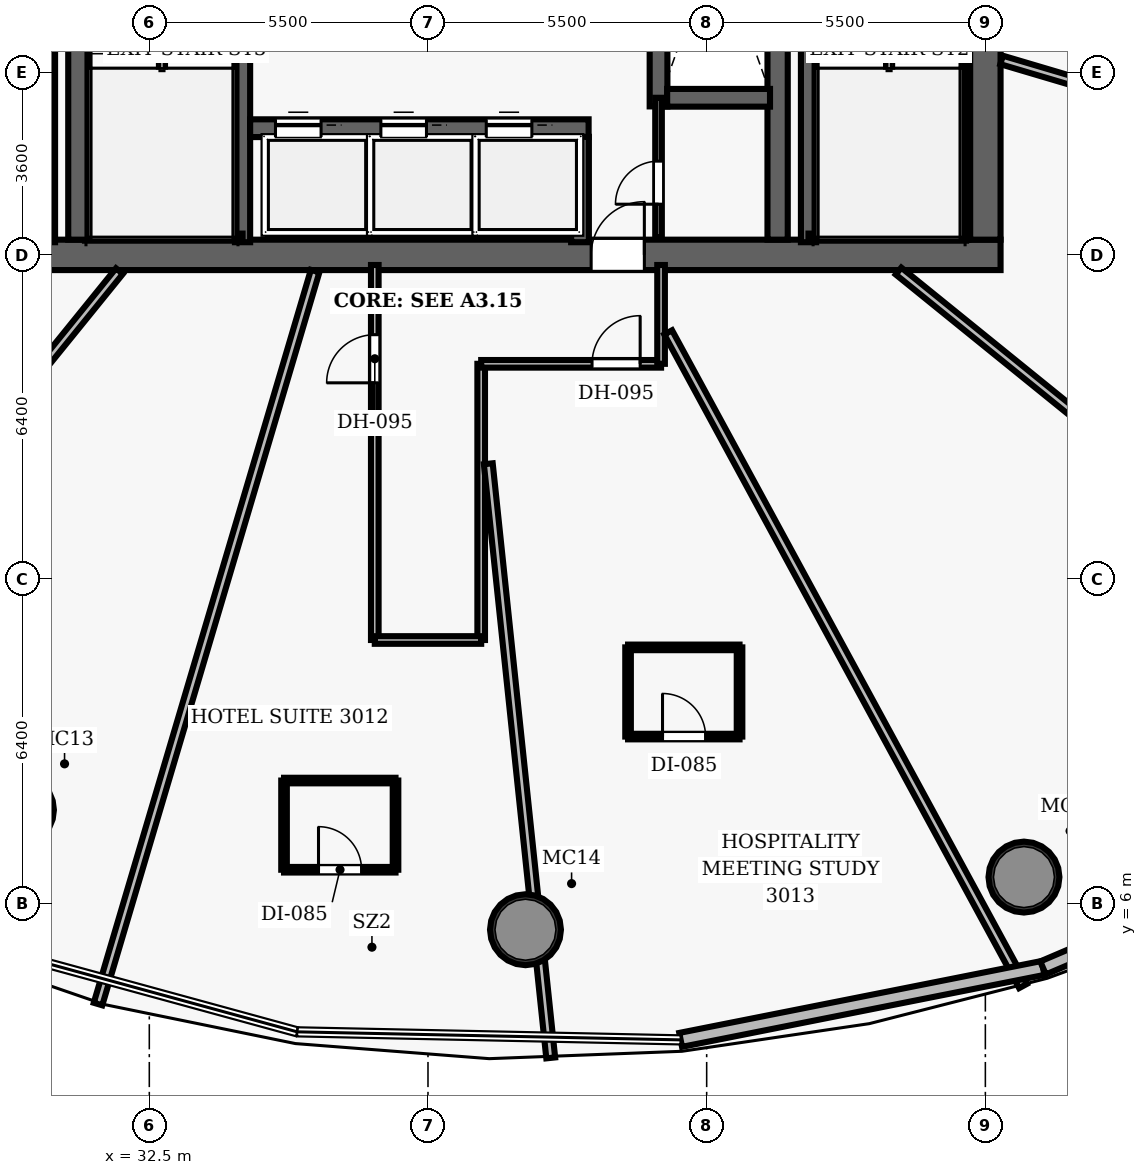
"""IFC4 building model, lengths in metres.
Left out: names, types, materials, properties, quantities, classifications, styles, units other than length and angle.
Written with IfcOpenShell. Run it as: python <this file> out.ifc"""

import sys

from ifc_helpers import new_model, si_unit, direction, frame, frame_2d, origin, origin_2d, place, context, subcontext, project, spatial, rectangle, hollow_circle, extrude, element, fill, save


model = new_model("IFC4")
c1 = context("Model", 3, precision=1e-05, world=origin(), true_north=direction((0.0, 1.0)))
c2 = subcontext(c1, "Body", "Model", "MODEL_VIEW")
j1 = project(units=[si_unit("LENGTHUNIT", "METRE"), si_unit("PLANEANGLEUNIT", "RADIAN")], contexts=[c1])
p1 = place(None, origin())
s1 = spatial("IfcSite", under=j1, at=p1, CompositionType="ELEMENT")
p2 = place(p1, origin())
s2 = spatial("IfcBuilding", under=s1, at=p2, CompositionType="ELEMENT")
p3 = place(p2, frame((0.0, 0.0, 123.8)))
s3 = spatial("IfcBuildingStorey", under=s2, at=p3, CompositionType="ELEMENT", Elevation=123.8)
p4 = place(p3, frame((26.7, 18.8, 0.0), z_axis=(0.0, 0.0, 1.0), x_axis=(1.0, 0.0, 0.0)))
e1 = element("IfcWall", 1, at=p4, inside=s3, PredefinedType="SHEAR", context=c2, shape_type="SweptSolid", body=[
    extrude(rectangle(XDim=22.6, YDim=0.6, at=frame_2d((11.3, 0.0))), origin(), (0.0, 0.0, 1.0), 3.5),
])
p5 = place(p4, frame((14.52, 0.0, 0.0)))
e2 = element("IfcOpeningElement", 2, at=p5, cuts=e1, PredefinedType="OPENING", context=c2, shape_type="SweptSolid", body=[
    extrude(rectangle(XDim=1.05, YDim=2.15, at=frame_2d((0.525, 1.075))), frame((0.0, 0.31, 0.0), z_axis=(0.0, -1.0, 0.0), x_axis=(1.0, 0.0, 0.0)), (0.0, 0.0, 1.0), 0.62),
])
p6 = place(p3, frame((49.0, 19.1, 0.0), z_axis=(0.0, 0.0, 1.0), x_axis=(0.0, 1.0, 0.0)))
e3 = element("IfcWall", 3, at=p6, inside=s3, PredefinedType="SHEAR", context=c2, shape_type="SweptSolid", body=[
    extrude(rectangle(XDim=13.8, YDim=0.6, at=frame_2d((6.9, 0.0))), origin(), (0.0, 0.0, 1.0), 3.5),
])
p7 = place(p6, frame((8.2, 0.0, 0.0)))
e4 = element("IfcOpeningElement", 4, at=p7, cuts=e3, PredefinedType="OPENING", context=c2, shape_type="SweptSolid", body=[
    extrude(rectangle(XDim=1.05, YDim=2.15, at=frame_2d((0.525, 1.075))), frame((0.0, 0.31, 0.0), z_axis=(0.0, -1.0, 0.0), x_axis=(1.0, 0.0, 0.0)), (0.0, 0.0, 1.0), 0.62),
])
for number, where, z_axis, x_axis in (
    (5, (31.1, 19.1, 0.0), (0.0, 0.0, 1.0), (0.0, 1.0, 0.0)),
    (6, (44.9, 19.1, 0.0), (0.0, 0.0, 1.0), (0.0, 1.0, 0.0)),
):
    element("IfcWall", number, at=place(p3, frame(where, z_axis=z_axis, x_axis=x_axis)), inside=s3, PredefinedType="SHEAR", context=c2, shape_type="SweptSolid", body=[
        extrude(rectangle(XDim=13.8, YDim=0.4, at=frame_2d((6.9, 0.0))), origin(), (0.0, 0.0, 1.0), 3.5),
    ])
for number, where, z_axis, x_axis in (
    (7, (29.917, 7.846, 0.0), (0.0, 0.0, 1.0), (1.0, 0.0, 0.0)),
    (8, (39.924, 5.483, 0.0), (0.0, 0.0, 1.0), (1.0, 0.0, 0.0)),
    (9, (49.762, 6.521, 0.0), (0.0, 0.0, 1.0), (1.0, 0.0, 0.0)),
):
    element("IfcColumn", number, at=place(p3, frame(where, z_axis=z_axis, x_axis=x_axis)), inside=s3, PredefinedType="COLUMN", context=c2, shape_type="SweptSolid", body=[
        extrude(hollow_circle(Radius=0.7, WallThickness=0.055, at=origin_2d()), origin(), (0.0, 0.0, 1.0), 3.5),
    ])
for number, where, z_axis, x_axis in (
    (10, (30.49, 19.05, 0.0), (0.0, 0.0, 1.0), (0.0, 1.0, 0.0)),
    (11, (45.51, 19.05, 0.0), (0.0, 0.0, 1.0), (0.0, 1.0, 0.0)),
):
    element("IfcWall", number, at=place(p3, frame(where, z_axis=z_axis, x_axis=x_axis)), inside=s3, PredefinedType="SHEAR", context=c2, shape_type="SweptSolid", body=[
        extrude(rectangle(XDim=7.5, YDim=0.3, at=frame_2d((3.75, 0.0))), origin(), (0.0, 0.0, 1.0), 3.5),
    ])
p8 = place(p3, frame((48.605, 19.1, 0.0), z_axis=(0.0, 0.0, 1.0), x_axis=(0.0, 1.0, 0.0)))
e12 = element("IfcWall", 12, at=p8, inside=s3, PredefinedType="SHEAR", context=c2, shape_type="SweptSolid", body=[
    extrude(rectangle(XDim=7.45, YDim=0.12, at=frame_2d((3.725, 0.0))), origin(), (0.0, 0.0, 1.0), 3.5),
])
p9 = place(p3, frame((45.51, 19.16, 0.0), z_axis=(0.0, 0.0, 1.0), x_axis=(1.0, 0.0, 0.0)))
e13 = element("IfcWall", 13, at=p9, inside=s3, PredefinedType="SHEAR", context=c2, shape_type="SweptSolid", body=[
    extrude(rectangle(XDim=3.095, YDim=0.12, at=frame_2d((1.547, 0.0))), origin(), (0.0, 0.0, 1.0), 3.5),
])
p10 = place(p3, frame((34.34, 19.05, 0.0), z_axis=(0.0, 0.0, 1.0), x_axis=(0.0, 1.0, 0.0)))
e14 = element("IfcWall", 14, at=p10, inside=s3, PredefinedType="SHEAR", context=c2, shape_type="SweptSolid", body=[
    extrude(rectangle(XDim=7.5, YDim=0.3, at=frame_2d((3.75, 0.0))), origin(), (0.0, 0.0, 1.0), 3.5),
])
p11 = place(p3, frame((31.3, 19.16, 0.0), z_axis=(0.0, 0.0, 1.0), x_axis=(1.0, 0.0, 0.0)))
e15 = element("IfcWall", 15, at=p11, inside=s3, PredefinedType="SHEAR", context=c2, shape_type="SweptSolid", body=[
    extrude(rectangle(XDim=3.04, YDim=0.12, at=frame_2d((1.52, 0.0))), origin(), (0.0, 0.0, 1.0), 3.5),
])
p12 = place(p3, frame((42.55, 21.73, 0.0), z_axis=(0.0, 0.0, 1.0), x_axis=(0.0, 1.0, 0.0)))
e16 = element("IfcWall", 16, at=p12, inside=s3, PredefinedType="SHEAR", context=c2, shape_type="SweptSolid", body=[
    extrude(rectangle(XDim=6.54, YDim=0.35, at=frame_2d((3.27, 0.0))), origin(), (0.0, 0.0, 1.0), 2.675),
])
p13 = place(p3, frame((42.72, 21.9, 0.0), z_axis=(0.0, 0.0, 1.0), x_axis=(1.0, 0.0, 0.0)))
e17 = element("IfcWall", 17, at=p13, inside=s3, PredefinedType="SHEAR", context=c2, shape_type="SweptSolid", body=[
    extrude(rectangle(XDim=2.03, YDim=0.35, at=frame_2d((1.015, 0.0))), origin(), (0.0, 0.0, 1.0), 2.675),
])
p14 = place(p3, frame((34.49, 21.3, 0.0), z_axis=(0.0, 0.0, 1.0), x_axis=(1.0, 0.0, 0.0)))
e18 = element("IfcWall", 18, at=p14, inside=s3, PredefinedType="SHEAR", context=c2, shape_type="SweptSolid", body=[
    extrude(rectangle(XDim=6.68, YDim=0.35, at=frame_2d((3.34, 0.0))), origin(), (0.0, 0.0, 1.0), 2.675),
])
p15 = place(p14, frame((0.5, 0.0, 0.0)))
e19 = element("IfcOpeningElement", 19, at=p15, cuts=e18, PredefinedType="OPENING", context=c2, shape_type="SweptSolid", body=[
    extrude(rectangle(XDim=0.9, YDim=2.15, at=frame_2d((0.45, 1.075))), frame((0.0, 0.185, 0.0), z_axis=(0.0, -1.0, 0.0), x_axis=(1.0, 0.0, 0.0)), (0.0, 0.0, 1.0), 0.37),
])
p16 = place(p14, frame((2.58, 0.0, 0.0)))
e20 = element("IfcOpeningElement", 20, at=p16, cuts=e18, PredefinedType="OPENING", context=c2, shape_type="SweptSolid", body=[
    extrude(rectangle(XDim=0.9, YDim=2.15, at=frame_2d((0.45, 1.075))), frame((0.0, 0.185, 0.0), z_axis=(0.0, -1.0, 0.0), x_axis=(1.0, 0.0, 0.0)), (0.0, 0.0, 1.0), 0.37),
])
p17 = place(p14, frame((4.66, 0.0, 0.0)))
e21 = element("IfcOpeningElement", 21, at=p17, cuts=e18, PredefinedType="OPENING", context=c2, shape_type="SweptSolid", body=[
    extrude(rectangle(XDim=0.9, YDim=2.15, at=frame_2d((0.45, 1.075))), frame((0.0, 0.185, 0.0), z_axis=(0.0, -1.0, 0.0), x_axis=(1.0, 0.0, 0.0)), (0.0, 0.0, 1.0), 0.37),
])
p18 = place(p3, frame((41.0, 19.05, 0.0), z_axis=(0.0, 0.0, 1.0), x_axis=(0.0, 1.0, 0.0)))
e22 = element("IfcWall", 22, at=p18, inside=s3, PredefinedType="SHEAR", context=c2, shape_type="SweptSolid", body=[
    extrude(rectangle(XDim=2.08, YDim=0.35, at=frame_2d((1.04, 0.0))), origin(), (0.0, 0.0, 1.0), 2.675),
])
p19 = place(p3, frame((42.55, 19.15, 0.0), z_axis=(0.0, 0.0, 1.0), x_axis=(0.0, 1.0, 0.0)))
e23 = element("IfcWall", 23, at=p19, inside=s3, PredefinedType="PARTITIONING", context=c2, shape_type="SweptSolid", body=[
    extrude(rectangle(XDim=2.75, YDim=0.13, at=frame_2d((1.375, 0.0))), origin(), (0.0, 0.0, 1.0), 2.675),
])
p20 = place(p19, frame((0.65, 0.0, 0.0)))
e24 = element("IfcOpeningElement", 24, at=p20, cuts=e23, PredefinedType="OPENING", context=c2, shape_type="SweptSolid", body=[
    extrude(rectangle(XDim=0.85, YDim=2.1, at=frame_2d((0.425, 1.05))), frame((0.0, 0.075, 0.0), z_axis=(0.0, -1.0, 0.0), x_axis=(1.0, 0.0, 0.0)), (0.0, 0.0, 1.0), 0.15),
])
p21 = place(p3, frame((36.95, 11.2, 0.0), z_axis=(0.0, 0.0, 1.0), x_axis=(0.0, 1.0, 0.0)))
e25 = element("IfcWall", 25, at=p21, inside=s3, PredefinedType="PARTITIONING", context=c2, shape_type="SweptSolid", body=[
    extrude(rectangle(XDim=7.4, YDim=0.15, at=frame_2d((3.7, 0.0))), origin(), (0.0, 0.0, 1.0), 2.675),
])
p22 = place(p21, frame((5.075, 0.0, 0.0)))
e26 = element("IfcOpeningElement", 26, at=p22, cuts=e25, PredefinedType="OPENING", context=c2, shape_type="SweptSolid", body=[
    extrude(rectangle(XDim=0.95, YDim=2.15, at=frame_2d((0.475, 1.075))), frame((0.0, 0.085, 0.0), z_axis=(0.0, -1.0, 0.0), x_axis=(1.0, 0.0, 0.0)), (0.0, 0.0, 1.0), 0.17),
])
p23 = place(p3, frame((39.05, 11.2, 0.0), z_axis=(0.0, 0.0, 1.0), x_axis=(0.0, 1.0, 0.0)))
e27 = element("IfcWall", 27, at=p23, inside=s3, PredefinedType="PARTITIONING", context=c2, shape_type="SweptSolid", body=[
    extrude(rectangle(XDim=5.45, YDim=0.15, at=frame_2d((2.725, 0.0))), origin(), (0.0, 0.0, 1.0), 2.675),
])
p24 = place(p3, frame((39.05, 16.65, 0.0), z_axis=(0.0, 0.0, 1.0), x_axis=(1.0, 0.0, 0.0)))
e28 = element("IfcWall", 28, at=p24, inside=s3, PredefinedType="PARTITIONING", context=c2, shape_type="SweptSolid", body=[
    extrude(rectangle(XDim=3.55, YDim=0.15, at=frame_2d((1.775, 0.0))), origin(), (0.0, 0.0, 1.0), 2.675),
])
p25 = place(p24, frame((2.188, 0.0, 0.0)))
e29 = element("IfcOpeningElement", 29, at=p25, cuts=e28, PredefinedType="OPENING", context=c2, shape_type="SweptSolid", body=[
    extrude(rectangle(XDim=0.95, YDim=2.15, at=frame_2d((0.475, 1.075))), frame((0.0, 0.085, 0.0), z_axis=(0.0, -1.0, 0.0), x_axis=(1.0, 0.0, 0.0)), (0.0, 0.0, 1.0), 0.17),
])
p26 = place(p3, frame((42.6, 16.65, 0.0), z_axis=(0.0, 0.0, 1.0), x_axis=(0.0, 1.0, 0.0)))
e30 = element("IfcWall", 30, at=p26, inside=s3, PredefinedType="PARTITIONING", context=c2, shape_type="SweptSolid", body=[
    extrude(rectangle(XDim=1.95, YDim=0.15, at=frame_2d((0.975, 0.0))), origin(), (0.0, 0.0, 1.0), 2.675),
])
p27 = place(p3, frame((36.95, 11.2, 0.0), z_axis=(0.0, 0.0, 1.0), x_axis=(1.0, 0.0, 0.0)))
e31 = element("IfcWall", 31, at=p27, inside=s3, PredefinedType="PARTITIONING", context=c2, shape_type="SweptSolid", body=[
    extrude(rectangle(XDim=2.1, YDim=0.15, at=frame_2d((1.05, 0.0))), origin(), (0.0, 0.0, 1.0), 2.675),
])
p28 = place(p3, frame((31.91, 18.48, 0.0), z_axis=(0.0, 0.0, 1.0), x_axis=(-0.629315289337, -0.777150092715, 0.0)))
e32 = element("IfcWall", 32, at=p28, inside=s3, PredefinedType="PARTITIONING", context=c2, shape_type="SweptSolid", body=[
    extrude(rectangle(XDim=13.738, YDim=0.175, at=frame_2d((6.869, 0.0))), origin(), (0.0, 0.0, 1.0), 2.675),
])
p29 = place(p3, frame((35.772, 18.48, 0.0), z_axis=(0.0, 0.0, 1.0), x_axis=(-0.284008430424, -0.958821782944, 0.0)))
e33 = element("IfcWall", 33, at=p29, inside=s3, PredefinedType="PARTITIONING", context=c2, shape_type="SweptSolid", body=[
    extrude(rectangle(XDim=15.085, YDim=0.175, at=frame_2d((7.543, 0.0))), origin(), (0.0, 0.0, 1.0), 2.675),
])
p30 = place(p3, frame((39.19, 14.678, 0.0), z_axis=(0.0, 0.0, 1.0), x_axis=(0.10453602325, -0.994521100753, 0.0)))
e34 = element("IfcWall", 34, at=p30, inside=s3, PredefinedType="PARTITIONING", context=c2, shape_type="SweptSolid", body=[
    extrude(rectangle(XDim=11.79, YDim=0.175, at=frame_2d((5.895, 0.0))), origin(), (0.0, 0.0, 1.0), 2.675),
])
p31 = place(p3, frame((42.74, 17.27, 0.0), z_axis=(0.0, 0.0, 1.0), x_axis=(0.477153165105, -0.87882015056, 0.0)))
e35 = element("IfcWall", 35, at=p31, inside=s3, PredefinedType="PARTITIONING", context=c2, shape_type="SweptSolid", body=[
    extrude(rectangle(XDim=14.677, YDim=0.175, at=frame_2d((7.338, 0.0))), origin(), (0.0, 0.0, 1.0), 2.675),
])
p32 = place(p3, frame((47.286, 18.48, 0.0), z_axis=(0.0, 0.0, 1.0), x_axis=(0.777152358987, -0.629312490676, 0.0)))
e36 = element("IfcWall", 36, at=p32, inside=s3, PredefinedType="PARTITIONING", context=c2, shape_type="SweptSolid", body=[
    extrude(rectangle(XDim=15.181, YDim=0.175, at=frame_2d((7.591, 0.0))), origin(), (0.0, 0.0, 1.0), 2.675),
])
p33 = place(p3, frame((49.32, 22.647, 0.0), z_axis=(0.0, 0.0, 1.0), x_axis=(0.958818034548, -0.284021084827, 0.0)))
e37 = element("IfcWall", 37, at=p33, inside=s3, PredefinedType="PARTITIONING", context=c2, shape_type="SweptSolid", body=[
    extrude(rectangle(XDim=16.194, YDim=0.175, at=frame_2d((8.097, 0.0))), origin(), (0.0, 0.0, 1.0), 2.675),
])
p34 = place(p3, frame((35.159, 6.666, 0.0), z_axis=(0.0, 0.0, 1.0), x_axis=(1.0, 0.0, 0.0)))
e38 = element("IfcWall", 38, at=p34, inside=s3, PredefinedType="PARTITIONING", context=c2, shape_type="SweptSolid", body=[
    extrude(rectangle(XDim=2.2, YDim=0.11, at=frame_2d((1.1, 0.0))), origin(), (0.0, 0.0, 1.0), 2.675),
])
p35 = place(p34, frame((0.68, 0.0, 0.0)))
e39 = element("IfcOpeningElement", 39, at=p35, cuts=e38, PredefinedType="OPENING", context=c2, shape_type="SweptSolid", body=[
    extrude(rectangle(XDim=0.85, YDim=2.1, at=frame_2d((0.425, 1.05))), frame((0.0, 0.065, 0.0), z_axis=(0.0, -1.0, 0.0), x_axis=(1.0, 0.0, 0.0)), (0.0, 0.0, 1.0), 0.13),
])
p36 = place(p3, frame((35.159, 8.426, 0.0), z_axis=(0.0, 0.0, 1.0), x_axis=(1.0, 0.0, 0.0)))
e40 = element("IfcWall", 40, at=p36, inside=s3, PredefinedType="PARTITIONING", context=c2, shape_type="SweptSolid", body=[
    extrude(rectangle(XDim=2.2, YDim=0.11, at=frame_2d((1.1, 0.0))), origin(), (0.0, 0.0, 1.0), 2.675),
])
for number, where, z_axis, x_axis in (
    (41, (35.159, 6.666, 0.0), (0.0, 0.0, 1.0), (0.0, 1.0, 0.0)),
    (42, (37.359, 6.666, 0.0), (0.0, 0.0, 1.0), (0.0, 1.0, 0.0)),
):
    element("IfcWall", number, at=place(p3, frame(where, z_axis=z_axis, x_axis=x_axis)), inside=s3, PredefinedType="PARTITIONING", context=c2, shape_type="SweptSolid", body=[
        extrude(rectangle(XDim=1.76, YDim=0.11, at=frame_2d((0.88, 0.0))), origin(), (0.0, 0.0, 1.0), 2.675),
    ])
p37 = place(p3, frame((41.948, 9.294, 0.0), z_axis=(0.0, 0.0, 1.0), x_axis=(1.0, 0.0, 0.0)))
e43 = element("IfcWall", 43, at=p37, inside=s3, PredefinedType="PARTITIONING", context=c2, shape_type="SweptSolid", body=[
    extrude(rectangle(XDim=2.2, YDim=0.11, at=frame_2d((1.1, 0.0))), origin(), (0.0, 0.0, 1.0), 2.675),
])
p38 = place(p37, frame((0.68, 0.0, 0.0)))
e44 = element("IfcOpeningElement", 44, at=p38, cuts=e43, PredefinedType="OPENING", context=c2, shape_type="SweptSolid", body=[
    extrude(rectangle(XDim=0.85, YDim=2.1, at=frame_2d((0.425, 1.05))), frame((0.0, 0.065, 0.0), z_axis=(0.0, -1.0, 0.0), x_axis=(1.0, 0.0, 0.0)), (0.0, 0.0, 1.0), 0.13),
])
p39 = place(p3, frame((41.948, 11.054, 0.0), z_axis=(0.0, 0.0, 1.0), x_axis=(1.0, 0.0, 0.0)))
e45 = element("IfcWall", 45, at=p39, inside=s3, PredefinedType="PARTITIONING", context=c2, shape_type="SweptSolid", body=[
    extrude(rectangle(XDim=2.2, YDim=0.11, at=frame_2d((1.1, 0.0))), origin(), (0.0, 0.0, 1.0), 2.675),
])
for number, where, z_axis, x_axis in (
    (46, (41.948, 9.294, 0.0), (0.0, 0.0, 1.0), (0.0, 1.0, 0.0)),
    (47, (44.149, 9.294, 0.0), (0.0, 0.0, 1.0), (0.0, 1.0, 0.0)),
):
    element("IfcWall", number, at=place(p3, frame(where, z_axis=z_axis, x_axis=x_axis)), inside=s3, PredefinedType="PARTITIONING", context=c2, shape_type="SweptSolid", body=[
        extrude(rectangle(XDim=1.76, YDim=0.11, at=frame_2d((0.88, 0.0))), origin(), (0.0, 0.0, 1.0), 2.675),
    ])
p40 = place(p3, frame((50.139, 4.728, 0.0), z_axis=(0.0, 0.0, 1.0), x_axis=(-0.980870626481, -0.194660766738, 0.0)))
e48 = element("IfcWall", 48, at=p40, inside=s3, PredefinedType="SOLIDWALL", context=c2, shape_type="SweptSolid", body=[
    extrude(rectangle(XDim=7.292, YDim=0.28, at=frame_2d((3.646, 0.0))), origin(), (0.0, 0.0, 1.0), 3.26),
])
p41 = place(p3, frame((56.269, 7.344, 0.0), z_axis=(0.0, 0.0, 1.0), x_axis=(-0.919727565701, -0.392557263197, 0.0)))
e49 = element("IfcWall", 49, at=p41, inside=s3, PredefinedType="SOLIDWALL", context=c2, shape_type="SweptSolid", body=[
    extrude(rectangle(XDim=6.665, YDim=0.28, at=frame_2d((3.333, 0.0))), origin(), (0.0, 0.0, 1.0), 3.26),
])
p42 = place(p5, origin())
e50 = element("IfcDoor", 50, at=p42, inside=s3, OperationType="SINGLE_SWING_RIGHT", PredefinedType="DOOR", context=c2, shape_type="SweptSolid", body=[
    extrude(rectangle(XDim=1.05, YDim=2.15, at=frame_2d((0.525, 1.075))), frame((0.0, 0.025, 0.0), z_axis=(0.0, -1.0, 0.0), x_axis=(1.0, 0.0, 0.0)), (0.0, 0.0, 1.0), 0.05),
])
fill(e2, e50)
p43 = place(p20, origin())
e51 = element("IfcDoor", 51, at=p43, inside=s3, OperationType="SINGLE_SWING_LEFT", PredefinedType="DOOR", context=c2, shape_type="SweptSolid", body=[
    extrude(rectangle(XDim=0.85, YDim=2.1, at=frame_2d((0.425, 1.05))), frame((0.0, 0.025, 0.0), z_axis=(0.0, -1.0, 0.0), x_axis=(1.0, 0.0, 0.0)), (0.0, 0.0, 1.0), 0.05),
])
fill(e24, e51)
p44 = place(p22, origin())
e52 = element("IfcDoor", 52, at=p44, inside=s3, OperationType="SINGLE_SWING_LEFT", PredefinedType="DOOR", context=c2, shape_type="SweptSolid", body=[
    extrude(rectangle(XDim=0.95, YDim=2.15, at=frame_2d((0.475, 1.075))), frame((0.0, 0.025, 0.0), z_axis=(0.0, -1.0, 0.0), x_axis=(1.0, 0.0, 0.0)), (0.0, 0.0, 1.0), 0.05),
])
fill(e26, e52)
p45 = place(p35, origin())
e53 = element("IfcDoor", 53, at=p45, inside=s3, OperationType="SINGLE_SWING_LEFT", PredefinedType="DOOR", context=c2, shape_type="SweptSolid", body=[
    extrude(rectangle(XDim=0.85, YDim=2.1, at=frame_2d((0.425, 1.05))), frame((0.0, 0.025, 0.0), z_axis=(0.0, -1.0, 0.0), x_axis=(1.0, 0.0, 0.0)), (0.0, 0.0, 1.0), 0.05),
])
fill(e39, e53)
p46 = place(p25, origin())
e54 = element("IfcDoor", 54, at=p46, inside=s3, OperationType="SINGLE_SWING_RIGHT", PredefinedType="DOOR", context=c2, shape_type="SweptSolid", body=[
    extrude(rectangle(XDim=0.95, YDim=2.15, at=frame_2d((0.475, 1.075))), frame((0.0, 0.025, 0.0), z_axis=(0.0, -1.0, 0.0), x_axis=(1.0, 0.0, 0.0)), (0.0, 0.0, 1.0), 0.05),
])
fill(e29, e54)
p47 = place(p38, origin())
e55 = element("IfcDoor", 55, at=p47, inside=s3, OperationType="SINGLE_SWING_LEFT", PredefinedType="DOOR", context=c2, shape_type="SweptSolid", body=[
    extrude(rectangle(XDim=0.85, YDim=2.1, at=frame_2d((0.425, 1.05))), frame((0.0, 0.025, 0.0), z_axis=(0.0, -1.0, 0.0), x_axis=(1.0, 0.0, 0.0)), (0.0, 0.0, 1.0), 0.05),
])
fill(e44, e55)
p48 = place(p15, origin())
e56 = element("IfcDoor", 56, at=p48, inside=s3, OperationType="SLIDING_TO_LEFT", PredefinedType="DOOR", context=c2, shape_type="SweptSolid", body=[
    extrude(rectangle(XDim=0.9, YDim=2.15, at=frame_2d((0.45, 1.075))), frame((0.0, 0.025, 0.0), z_axis=(0.0, -1.0, 0.0), x_axis=(1.0, 0.0, 0.0)), (0.0, 0.0, 1.0), 0.05),
])
fill(e19, e56)
p49 = place(p16, origin())
e57 = element("IfcDoor", 57, at=p49, inside=s3, OperationType="SLIDING_TO_LEFT", PredefinedType="DOOR", context=c2, shape_type="SweptSolid", body=[
    extrude(rectangle(XDim=0.9, YDim=2.15, at=frame_2d((0.45, 1.075))), frame((0.0, 0.025, 0.0), z_axis=(0.0, -1.0, 0.0), x_axis=(1.0, 0.0, 0.0)), (0.0, 0.0, 1.0), 0.05),
])
fill(e20, e57)
p50 = place(p17, origin())
e58 = element("IfcDoor", 58, at=p50, inside=s3, OperationType="SLIDING_TO_LEFT", PredefinedType="DOOR", context=c2, shape_type="SweptSolid", body=[
    extrude(rectangle(XDim=0.9, YDim=2.15, at=frame_2d((0.45, 1.075))), frame((0.0, 0.025, 0.0), z_axis=(0.0, -1.0, 0.0), x_axis=(1.0, 0.0, 0.0)), (0.0, 0.0, 1.0), 0.05),
])
fill(e21, e58)
save(model, sys.argv[1])
